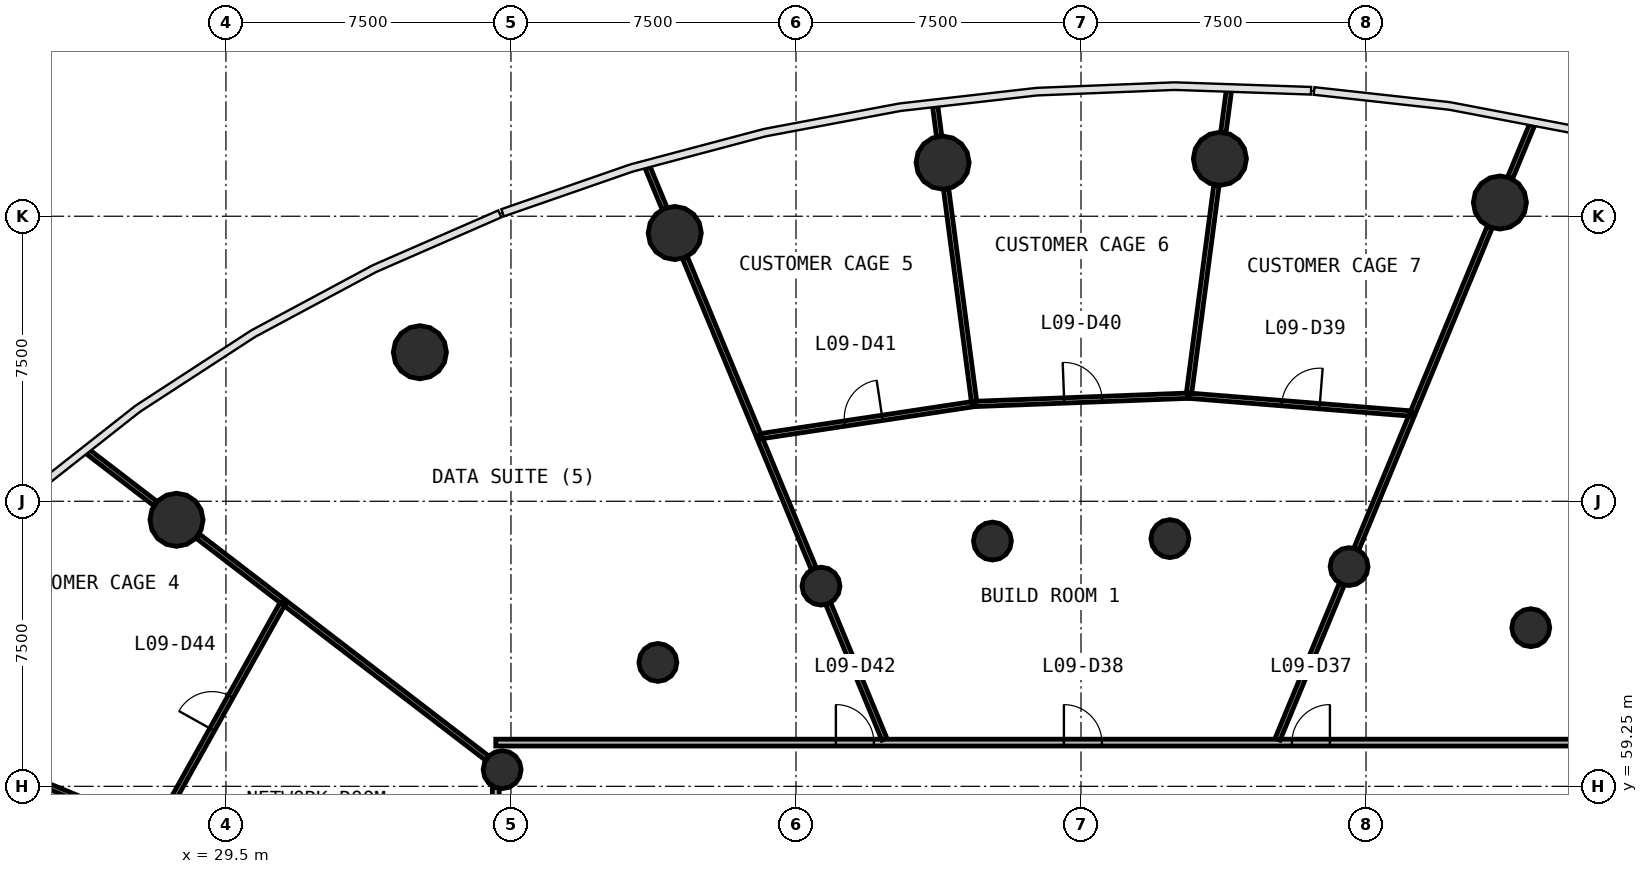
"""IFC4 building model, lengths in metres.
Left out: names, types, materials, properties, quantities, classifications, styles, units other than length and angle.
Written with IfcOpenShell. Run it as: python <this file> out.ifc"""

import sys

from ifc_helpers import new_model, si_unit, direction, frame, frame_2d, origin, origin_2d, place, context, subcontext, project, spatial, rectangle, circle, extrude, source, transform, mapped, element, fill, save


model = new_model("IFC4")
c1 = context("Model", 3, precision=1e-05, world=origin(), true_north=direction((0.0, 1.0)))
c2 = subcontext(c1, "Body", "Model", "MODEL_VIEW")
j1 = project(units=[si_unit("LENGTHUNIT", "METRE"), si_unit("PLANEANGLEUNIT", "RADIAN")], contexts=[c1])
p1 = place(None, origin())
s1 = spatial("IfcSite", under=j1, at=p1, CompositionType="ELEMENT")
p2 = place(p1, origin())
s2 = spatial("IfcBuilding", under=s1, at=p2, CompositionType="ELEMENT")
p3 = place(p2, frame((0.0, 0.0, 40.2)))
s3 = spatial("IfcBuildingStorey", under=s2, at=p3, CompositionType="ELEMENT", Elevation=40.2)
m1 = source(origin(), c2, "Body", "SweptSolid", [
    extrude(circle(Radius=0.7, at=origin_2d()), origin(), (0.0, 0.0, 1.0), 4.4),
])
for number, where, z_axis, x_axis in (
    (1, (63.023, 74.611, 0.0), (0.0, 0.0, 1.0), (1.0, 0.0, 0.0)),
    (2, (55.655, 75.761, 0.0), (0.0, 0.0, 1.0), (1.0, 0.0, 0.0)),
    (3, (48.358, 75.661, 0.0), (0.0, 0.0, 1.0), (1.0, 0.0, 0.0)),
    (4, (41.31, 73.809, 0.0), (0.0, 0.0, 1.0), (1.0, 0.0, 0.0)),
    (5, (34.604, 70.672, 0.0), (0.0, 0.0, 1.0), (1.0, 0.0, 0.0)),
    (6, (28.199, 66.263, 0.0), (0.0, 0.0, 1.0), (1.0, 0.0, 0.0)),
):
    element("IfcColumn", number, at=place(p3, frame(where, z_axis=z_axis, x_axis=x_axis)), inside=s3, PredefinedType="COLUMN", context=c2, shape_type="MappedRepresentation", body=[
        mapped(m1, transform((0.0, 0.0, 0.0), scale=1.0)),
    ])
m2 = source(origin(), c2, "Body", "SweptSolid", [
    extrude(circle(Radius=0.5, at=origin_2d()), origin(), (0.0, 0.0, 1.0), 4.4),
])
for number, where, z_axis, x_axis in (
    (7, (63.835, 63.424, 0.0), (0.0, 0.0, 1.0), (1.0, 0.0, 0.0)),
    (8, (59.055, 65.031, 0.0), (0.0, 0.0, 1.0), (1.0, 0.0, 0.0)),
    (9, (54.339, 65.767, 0.0), (0.0, 0.0, 1.0), (1.0, 0.0, 0.0)),
    (10, (49.669, 65.703, 0.0), (0.0, 0.0, 1.0), (1.0, 0.0, 0.0)),
    (11, (45.158, 64.518, 0.0), (0.0, 0.0, 1.0), (1.0, 0.0, 0.0)),
    (12, (40.866, 62.51, 0.0), (0.0, 0.0, 1.0), (1.0, 0.0, 0.0)),
    (13, (36.768, 59.688, 0.0), (0.0, 0.0, 1.0), (1.0, 0.0, 0.0)),
):
    element("IfcColumn", number, at=place(p3, frame(where, z_axis=z_axis, x_axis=x_axis)), inside=s3, PredefinedType="COLUMN", context=c2, shape_type="MappedRepresentation", body=[
        mapped(m2, transform((0.0, 0.0, 0.0), scale=1.0)),
    ])
p4 = place(p3, frame((36.6, 60.4, 0.0), z_axis=(0.0, 0.0, 1.0), x_axis=(1.0, 0.0, 0.0)))
e14 = element("IfcWall", 14, at=p4, inside=s3, PredefinedType="PARTITIONING", context=c2, shape_type="SweptSolid", body=[
    extrude(rectangle(XDim=30.8, YDim=0.18, at=frame_2d((15.4, 0.0))), origin(), (0.0, 0.0, 1.0), 3.05),
])
p5 = place(p4, frame((20.95, 0.0, 0.0)))
e15 = element("IfcOpeningElement", 15, at=p5, cuts=e14, PredefinedType="OPENING", context=c2, shape_type="SweptSolid", body=[
    extrude(rectangle(XDim=1.0, YDim=2.1, at=frame_2d((0.5, 1.05))), frame((0.0, 0.1, 0.0), z_axis=(0.0, -1.0, 0.0), x_axis=(1.0, 0.0, 0.0)), (0.0, 0.0, 1.0), 0.2),
])
p6 = place(p4, frame((14.95, 0.0, 0.0)))
e16 = element("IfcOpeningElement", 16, at=p6, cuts=e14, PredefinedType="OPENING", context=c2, shape_type="SweptSolid", body=[
    extrude(rectangle(XDim=1.0, YDim=2.1, at=frame_2d((0.5, 1.05))), frame((0.0, 0.1, 0.0), z_axis=(0.0, -1.0, 0.0), x_axis=(1.0, 0.0, 0.0)), (0.0, 0.0, 1.0), 0.2),
])
p7 = place(p4, frame((8.95, 0.0, 0.0)))
e17 = element("IfcOpeningElement", 17, at=p7, cuts=e14, PredefinedType="OPENING", context=c2, shape_type="SweptSolid", body=[
    extrude(rectangle(XDim=1.0, YDim=2.1, at=frame_2d((0.5, 1.05))), frame((0.0, 0.1, 0.0), z_axis=(0.0, -1.0, 0.0), x_axis=(1.0, 0.0, 0.0)), (0.0, 0.0, 1.0), 0.2),
])
p8 = place(p3, frame((36.6, 35.63, 0.0), z_axis=(0.0, 0.0, 1.0), x_axis=(0.0, 1.0, 0.0)))
e18 = element("IfcWall", 18, at=p8, inside=s3, PredefinedType="PARTITIONING", context=c2, shape_type="SweptSolid", body=[
    extrude(rectangle(XDim=23.583, YDim=0.18, at=frame_2d((11.791, 0.0))), origin(), (0.0, 0.0, 1.0), 3.05),
])
p9 = place(p8, frame((16.032, 0.0, 0.0)))
e19 = element("IfcOpeningElement", 19, at=p9, cuts=e18, PredefinedType="OPENING", context=c2, shape_type="SweptSolid", body=[
    extrude(rectangle(XDim=0.9, YDim=2.1, at=frame_2d((0.45, 1.05))), frame((0.0, 0.1, 0.0), z_axis=(0.0, -1.0, 0.0), x_axis=(1.0, 0.0, 0.0)), (0.0, 0.0, 1.0), 0.2),
])
p10 = place(p8, frame((13.232, 0.0, 0.0)))
e20 = element("IfcOpeningElement", 20, at=p10, cuts=e18, PredefinedType="OPENING", context=c2, shape_type="SweptSolid", body=[
    extrude(rectangle(XDim=0.9, YDim=2.1, at=frame_2d((0.45, 1.05))), frame((0.0, 0.1, 0.0), z_axis=(0.0, -1.0, 0.0), x_axis=(1.0, 0.0, 0.0)), (0.0, 0.0, 1.0), 0.2),
])
p11 = place(p8, frame((11.433, 0.0, 0.0)))
e21 = element("IfcOpeningElement", 21, at=p11, cuts=e18, PredefinedType="OPENING", context=c2, shape_type="SweptSolid", body=[
    extrude(rectangle(XDim=0.9, YDim=2.1, at=frame_2d((0.45, 1.05))), frame((0.0, 0.1, 0.0), z_axis=(0.0, -1.0, 0.0), x_axis=(1.0, 0.0, 0.0)), (0.0, 0.0, 1.0), 0.2),
])
p12 = place(p8, frame((9.133, 0.0, 0.0)))
e22 = element("IfcOpeningElement", 22, at=p12, cuts=e18, PredefinedType="OPENING", context=c2, shape_type="SweptSolid", body=[
    extrude(rectangle(XDim=1.0, YDim=2.1, at=frame_2d((0.5, 1.05))), frame((0.0, 0.1, 0.0), z_axis=(0.0, -1.0, 0.0), x_axis=(1.0, 0.0, 0.0)), (0.0, 0.0, 1.0), 0.2),
])
p13 = place(p8, frame((19.133, 0.0, 0.0)))
e23 = element("IfcOpeningElement", 23, at=p13, cuts=e18, PredefinedType="OPENING", context=c2, shape_type="SweptSolid", body=[
    extrude(rectangle(XDim=1.0, YDim=2.1, at=frame_2d((0.5, 1.05))), frame((0.0, 0.1, 0.0), z_axis=(0.0, -1.0, 0.0), x_axis=(1.0, 0.0, 0.0)), (0.0, 0.0, 1.0), 0.2),
])
p14 = place(p3, frame((27.65, 58.086, 0.0), z_axis=(0.0, 0.0, 1.0), x_axis=(0.488058671377, 0.872810823314, 0.0)))
e24 = element("IfcWall", 24, at=p14, inside=s3, PredefinedType="PARTITIONING", context=c2, shape_type="SweptSolid", body=[
    extrude(rectangle(XDim=6.894, YDim=0.14, at=frame_2d((3.447, 0.0))), origin(), (0.0, 0.0, 1.0), 3.05),
])
p15 = place(p14, frame((3.043, 0.0, 0.0)))
e25 = element("IfcOpeningElement", 25, at=p15, cuts=e24, PredefinedType="OPENING", context=c2, shape_type="SweptSolid", body=[
    extrude(rectangle(XDim=1.0, YDim=2.1, at=frame_2d((0.5, 1.05))), frame((0.0, 0.08, 0.0), z_axis=(0.0, -1.0, 0.0), x_axis=(1.0, 0.0, 0.0)), (0.0, 0.0, 1.0), 0.16),
])
p16 = place(p3, frame((36.367, 59.995, 0.0), z_axis=(0.0, 0.0, 1.0), x_axis=(-0.793356148501, 0.60875776926, 0.0)))
e26 = element("IfcWall", 26, at=p16, inside=s3, PredefinedType="PARTITIONING", context=c2, shape_type="SweptSolid", body=[
    extrude(rectangle(XDim=6.676, YDim=0.14, at=frame_2d((3.338, 0.0))), origin(), (0.0, 0.0, 1.0), 3.05),
])
p17 = place(p3, frame((54.834, 69.529, 0.0), z_axis=(0.0, 0.0, 1.0), x_axis=(0.996792896181, -0.080024509517, 0.0)))
e27 = element("IfcWall", 27, at=p17, inside=s3, PredefinedType="PARTITIONING", context=c2, shape_type="SweptSolid", body=[
    extrude(rectangle(XDim=5.906, YDim=0.14, at=frame_2d((2.953, 0.0))), origin(), (0.0, 0.0, 1.0), 3.05),
])
p18 = place(p17, frame((2.456, 0.0, 0.0)))
e28 = element("IfcOpeningElement", 28, at=p18, cuts=e27, PredefinedType="OPENING", context=c2, shape_type="SweptSolid", body=[
    extrude(rectangle(XDim=1.0, YDim=2.1, at=frame_2d((0.5, 1.05))), frame((0.0, 0.08, 0.0), z_axis=(0.0, -1.0, 0.0), x_axis=(1.0, 0.0, 0.0)), (0.0, 0.0, 1.0), 0.16),
])
p19 = place(p3, frame((43.527, 68.455, 0.0), z_axis=(0.0, 0.0, 1.0), x_axis=(0.988798137766, 0.149258978793, 0.0)))
e29 = element("IfcWall", 29, at=p19, inside=s3, PredefinedType="PARTITIONING", context=c2, shape_type="SweptSolid", body=[
    extrude(rectangle(XDim=5.731, YDim=0.14, at=frame_2d((2.866, 0.0))), origin(), (0.0, 0.0, 1.0), 3.05),
])
p20 = place(p19, frame((2.281, 0.0, 0.0)))
e30 = element("IfcOpeningElement", 30, at=p20, cuts=e29, PredefinedType="OPENING", context=c2, shape_type="SweptSolid", body=[
    extrude(rectangle(XDim=1.0, YDim=2.1, at=frame_2d((0.5, 1.05))), frame((0.0, 0.08, 0.0), z_axis=(0.0, -1.0, 0.0), x_axis=(1.0, 0.0, 0.0)), (0.0, 0.0, 1.0), 0.16),
])
p21 = place(p3, frame((49.19, 69.341, 0.0), z_axis=(0.0, 0.0, 1.0), x_axis=(-0.130528011015, 0.991444621923, 0.0)))
e31 = element("IfcWall", 31, at=p21, inside=s3, PredefinedType="PARTITIONING", context=c2, shape_type="SweptSolid", body=[
    extrude(rectangle(XDim=5.671, YDim=0.14, at=frame_2d((2.835, 0.0))), origin(), (0.0, 0.0, 1.0), 3.05),
])
p22 = place(p3, frame((49.224, 69.312, 0.0), z_axis=(0.0, 0.0, 1.0), x_axis=(0.999256193505, 0.038562413593, 0.0)))
e32 = element("IfcWall", 32, at=p22, inside=s3, PredefinedType="PARTITIONING", context=c2, shape_type="SweptSolid", body=[
    extrude(rectangle(XDim=5.584, YDim=0.14, at=frame_2d((2.792, 0.0))), origin(), (0.0, 0.0, 1.0), 3.05),
])
p23 = place(p22, frame((2.334, 0.0, 0.0)))
e33 = element("IfcOpeningElement", 33, at=p23, cuts=e32, PredefinedType="OPENING", context=c2, shape_type="SweptSolid", body=[
    extrude(rectangle(XDim=1.0, YDim=2.1, at=frame_2d((0.5, 1.05))), frame((0.0, 0.08, 0.0), z_axis=(0.0, -1.0, 0.0), x_axis=(1.0, 0.0, 0.0)), (0.0, 0.0, 1.0), 0.16),
])
p24 = place(p3, frame((54.844, 69.598, 0.0), z_axis=(0.0, 0.0, 1.0), x_axis=(0.130518669044, 0.99144585179, 0.0)))
e34 = element("IfcWall", 34, at=p24, inside=s3, PredefinedType="PARTITIONING", context=c2, shape_type="SweptSolid", body=[
    extrude(rectangle(XDim=5.512, YDim=0.14, at=frame_2d((2.756, 0.0))), origin(), (0.0, 0.0, 1.0), 3.05),
])
p25 = place(p3, frame((60.733, 69.084, 0.0), z_axis=(0.0, 0.0, 1.0), x_axis=(0.382663625013, 0.923887736736, 0.0)))
e35 = element("IfcWall", 35, at=p25, inside=s3, PredefinedType="PARTITIONING", context=c2, shape_type="SweptSolid", body=[
    extrude(rectangle(XDim=5.278, YDim=0.14, at=frame_2d((2.639, 0.0))), origin(), (0.0, 0.0, 1.0), 3.05),
])
p26 = place(p3, frame((43.516, 68.483, 0.0), z_axis=(0.0, 0.0, 1.0), x_axis=(-0.382661484527, 0.923888623298, 0.0)))
e36 = element("IfcWall", 36, at=p26, inside=s3, PredefinedType="PARTITIONING", context=c2, shape_type="SweptSolid", body=[
    extrude(rectangle(XDim=5.059, YDim=0.14, at=frame_2d((2.53, 0.0))), origin(), (0.0, 0.0, 1.0), 3.05),
])
p27 = place(p3, frame((27.623, 58.097, 0.0), z_axis=(0.0, 0.0, 1.0), x_axis=(-0.923864356011, 0.382720069622, 0.0)))
e37 = element("IfcWall", 37, at=p27, inside=s3, PredefinedType="PARTITIONING", context=c2, shape_type="SweptSolid", body=[
    extrude(rectangle(XDim=4.996, YDim=0.14, at=frame_2d((2.498, 0.0))), origin(), (0.0, 0.0, 1.0), 3.05),
])
p28 = place(p3, frame((57.174, 60.49, 0.0), z_axis=(0.0, 0.0, 1.0), x_axis=(0.382672831764, 0.923883923353, 0.0)))
e38 = element("IfcWall", 38, at=p28, inside=s3, PredefinedType="PARTITIONING", context=c2, shape_type="SweptSolid", body=[
    extrude(rectangle(XDim=4.41, YDim=0.14, at=frame_2d((2.205, 0.0))), origin(), (0.0, 0.0, 1.0), 3.05),
])
p29 = place(p3, frame((46.826, 60.49, 0.0), z_axis=(0.0, 0.0, 1.0), x_axis=(-0.382644558062, 0.923895633817, 0.0)))
e39 = element("IfcWall", 39, at=p29, inside=s3, PredefinedType="PARTITIONING", context=c2, shape_type="SweptSolid", body=[
    extrude(rectangle(XDim=3.854, YDim=0.14, at=frame_2d((1.927, 0.0))), origin(), (0.0, 0.0, 1.0), 3.05),
])
p30 = place(p3, frame((59.248, 65.498, 0.0), z_axis=(0.0, 0.0, 1.0), x_axis=(0.382705657047, 0.923870326434, 0.0)))
e40 = element("IfcWall", 40, at=p30, inside=s3, PredefinedType="PARTITIONING", context=c2, shape_type="SweptSolid", body=[
    extrude(rectangle(XDim=3.778, YDim=0.14, at=frame_2d((1.889, 0.0))), origin(), (0.0, 0.0, 1.0), 3.05),
])
p31 = place(p3, frame((44.965, 64.984, 0.0), z_axis=(0.0, 0.0, 1.0), x_axis=(-0.382728210893, 0.923860983366, 0.0)))
e41 = element("IfcWall", 41, at=p31, inside=s3, PredefinedType="PARTITIONING", context=c2, shape_type="SweptSolid", body=[
    extrude(rectangle(XDim=3.685, YDim=0.14, at=frame_2d((1.843, 0.0))), origin(), (0.0, 0.0, 1.0), 3.05),
])
p32 = place(p3, frame((30.991, 64.121, 0.0), z_axis=(0.0, 0.0, 1.0), x_axis=(-0.793361942245, 0.60875021856, 0.0)))
e42 = element("IfcWall", 42, at=p32, inside=s3, PredefinedType="PARTITIONING", context=c2, shape_type="SweptSolid", body=[
    extrude(rectangle(XDim=2.814, YDim=0.14, at=frame_2d((1.407, 0.0))), origin(), (0.0, 0.0, 1.0), 3.05),
])
p33 = place(p3, frame((27.641, 66.691, 0.0), z_axis=(0.0, 0.0, 1.0), x_axis=(-0.793298337488, 0.608833103353, 0.0)))
e43 = element("IfcWall", 43, at=p33, inside=s3, PredefinedType="PARTITIONING", context=c2, shape_type="SweptSolid", body=[
    extrude(rectangle(XDim=2.246, YDim=0.14, at=frame_2d((1.123, 0.0))), origin(), (0.0, 0.0, 1.0), 3.05),
])
p34 = place(p3, frame((63.292, 75.263, 0.0), z_axis=(0.0, 0.0, 1.0), x_axis=(0.382746232653, 0.92385351728, 0.0)))
e44 = element("IfcWall", 44, at=p34, inside=s3, PredefinedType="PARTITIONING", context=c2, shape_type="SweptSolid", body=[
    extrude(rectangle(XDim=1.512, YDim=0.14, at=frame_2d((0.756, 0.0))), origin(), (0.0, 0.0, 1.0), 3.05),
])
p35 = place(p3, frame((41.04, 74.46, 0.0), z_axis=(0.0, 0.0, 1.0), x_axis=(-0.382506735336, 0.923952703022, 0.0)))
e45 = element("IfcWall", 45, at=p35, inside=s3, PredefinedType="PARTITIONING", context=c2, shape_type="SweptSolid", body=[
    extrude(rectangle(XDim=1.16, YDim=0.14, at=frame_2d((0.58, 0.0))), origin(), (0.0, 0.0, 1.0), 3.05),
])
p36 = place(p3, frame((55.747, 76.46, 0.0), z_axis=(0.0, 0.0, 1.0), x_axis=(0.130414214124, 0.991459597137, 0.0)))
e46 = element("IfcWall", 46, at=p36, inside=s3, PredefinedType="PARTITIONING", context=c2, shape_type="SweptSolid", body=[
    extrude(rectangle(XDim=1.097, YDim=0.14, at=frame_2d((0.548, 0.0))), origin(), (0.0, 0.0, 1.0), 3.05),
])
p37 = place(p3, frame((48.266, 76.36, 0.0), z_axis=(0.0, 0.0, 1.0), x_axis=(-0.13053490902, 0.991443713746, 0.0)))
e47 = element("IfcWall", 47, at=p37, inside=s3, PredefinedType="PARTITIONING", context=c2, shape_type="SweptSolid", body=[
    extrude(rectangle(XDim=0.786, YDim=0.14, at=frame_2d((0.393, 0.0))), origin(), (0.0, 0.0, 1.0), 3.05),
])
m3 = source(origin(), c2, "Body", "SweptSolid", [
    extrude(rectangle(XDim=1.0, YDim=2.1, at=frame_2d((0.5, 1.05))), frame((0.0, 0.025, 0.0), z_axis=(0.0, -1.0, 0.0), x_axis=(1.0, 0.0, 0.0)), (0.0, 0.0, 1.0), 0.05),
])
p38 = place(p5, origin())
e48 = element("IfcDoor", 48, at=p38, inside=s3, OperationType="SINGLE_SWING_RIGHT", PredefinedType="DOOR", context=c2, shape_type="MappedRepresentation", body=[
    mapped(m3, transform((0.0, 0.0, 0.0), scale=1.0)),
])
fill(e15, e48)
p39 = place(p6, origin())
e49 = element("IfcDoor", 49, at=p39, inside=s3, OperationType="SINGLE_SWING_LEFT", PredefinedType="DOOR", context=c2, shape_type="MappedRepresentation", body=[
    mapped(m3, transform((0.0, 0.0, 0.0), scale=1.0)),
])
fill(e16, e49)
p40 = place(p18, origin())
e50 = element("IfcDoor", 50, at=p40, inside=s3, OperationType="SINGLE_SWING_RIGHT", PredefinedType="DOOR", context=c2, shape_type="MappedRepresentation", body=[
    mapped(m3, transform((0.0, 0.0, 0.0), scale=1.0)),
])
fill(e28, e50)
p41 = place(p23, origin())
e51 = element("IfcDoor", 51, at=p41, inside=s3, OperationType="SINGLE_SWING_LEFT", PredefinedType="DOOR", context=c2, shape_type="MappedRepresentation", body=[
    mapped(m3, transform((0.0, 0.0, 0.0), scale=1.0)),
])
fill(e33, e51)
p42 = place(p20, origin())
e52 = element("IfcDoor", 52, at=p42, inside=s3, OperationType="SINGLE_SWING_RIGHT", PredefinedType="DOOR", context=c2, shape_type="MappedRepresentation", body=[
    mapped(m3, transform((0.0, 0.0, 0.0), scale=1.0)),
])
fill(e30, e52)
p43 = place(p7, origin())
e53 = element("IfcDoor", 53, at=p43, inside=s3, OperationType="SINGLE_SWING_LEFT", PredefinedType="DOOR", context=c2, shape_type="MappedRepresentation", body=[
    mapped(m3, transform((0.0, 0.0, 0.0), scale=1.0)),
])
fill(e17, e53)
p44 = place(p15, origin())
e54 = element("IfcDoor", 54, at=p44, inside=s3, OperationType="SINGLE_SWING_LEFT", PredefinedType="DOOR", context=c2, shape_type="MappedRepresentation", body=[
    mapped(m3, transform((0.0, 0.0, 0.0), scale=1.0)),
])
fill(e25, e54)
save(model, sys.argv[1])
